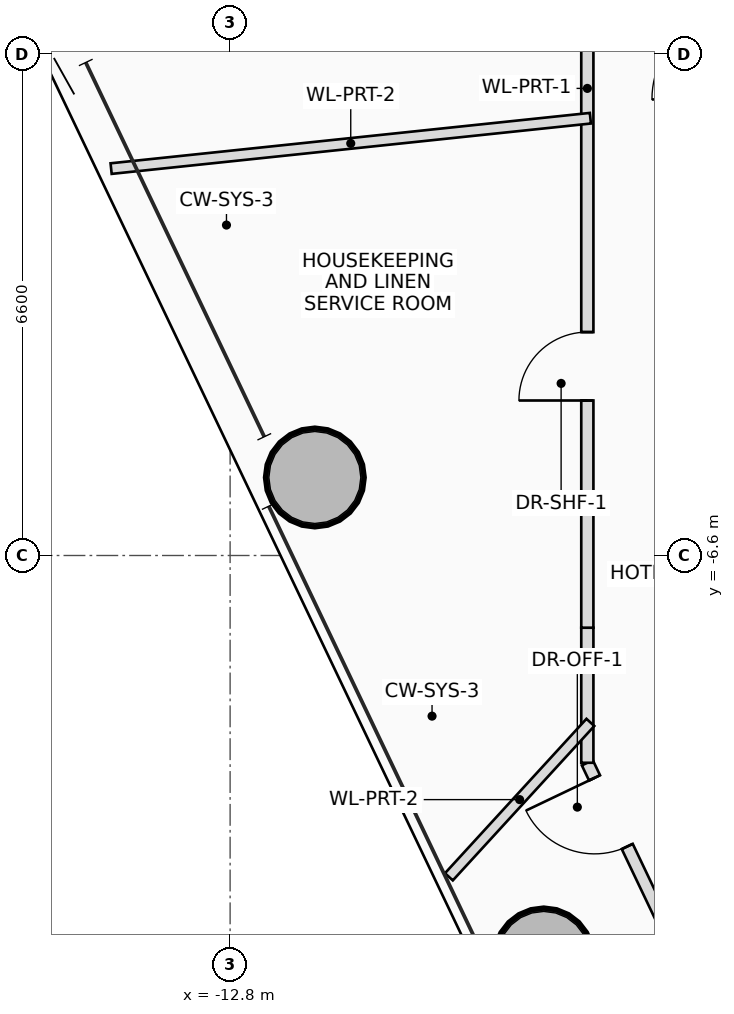
"""IFC4 building model, lengths in metres.
Left out: names, types, materials, properties, quantities, classifications, styles, units other than length and angle.
Written with IfcOpenShell. Run it as: python <this file> out.ifc"""

import sys

from ifc_helpers import new_model, si_unit, direction, frame, frame_2d, origin, origin_2d, place, context, subcontext, project, spatial, rectangle, hollow_circle, extrude, source, transform, mapped, element, fill, save


model = new_model("IFC4")
c1 = context("Model", 3, precision=1e-05, world=origin(), true_north=direction((0.0, 1.0)))
c2 = subcontext(c1, "Body", "Model", "MODEL_VIEW")
j1 = project(units=[si_unit("LENGTHUNIT", "METRE"), si_unit("PLANEANGLEUNIT", "RADIAN")], contexts=[c1])
p1 = place(None, origin())
s1 = spatial("IfcSite", under=j1, at=p1, CompositionType="ELEMENT")
p2 = place(p1, origin())
s2 = spatial("IfcBuilding", under=s1, at=p2, CompositionType="ELEMENT")
p3 = place(p2, frame((0.0, 0.0, 132.95)))
s3 = spatial("IfcBuildingStorey", under=s2, at=p3, CompositionType="ELEMENT", Elevation=132.95)
m1 = source(origin(), c2, "Body", "SweptSolid", [
    extrude(hollow_circle(Radius=0.65, WallThickness=0.045, at=origin_2d()), origin(), (0.0, 0.0, 1.0), 3.45),
])
for number, where, z_axis, x_axis in (
    (1, (-11.685, -5.573, 0.0), (0.0, 0.0, 1.0), (1.0, 0.0, 0.0)),
    (2, (-8.674, -11.888, 0.0), (0.0, 0.0, 1.0), (1.0, 0.0, 0.0)),
):
    element("IfcColumn", number, at=place(p3, frame(where, z_axis=z_axis, x_axis=x_axis)), inside=s3, PredefinedType="COLUMN", context=c2, shape_type="MappedRepresentation", body=[
        mapped(m1, transform((0.0, 0.0, 0.0), scale=1.0)),
    ])
p4 = place(p3, frame((-6.539, -12.6, 0.0), z_axis=(0.0, 0.0, 1.0), x_axis=(-0.430521464151, 0.902580339308, 0.0)))
e3 = element("IfcWall", 3, at=p4, inside=s3, PredefinedType="PARTITIONING", context=c2, shape_type="SweptSolid", body=[
    extrude(rectangle(XDim=3.626, YDim=0.16, at=frame_2d((1.813, 0.0))), origin(), (0.0, 0.0, 1.0), 2.605),
])
p5 = place(p4, frame((2.406, 0.0, 0.0)))
e4 = element("IfcOpeningElement", 4, at=p5, cuts=e3, PredefinedType="OPENING", context=c2, shape_type="SweptSolid", body=[
    extrude(rectangle(XDim=1.0, YDim=2.25, at=frame_2d((0.5, 1.125))), frame((0.0, 0.09, 0.0), z_axis=(0.0, -1.0, 0.0), x_axis=(1.0, 0.0, 0.0)), (0.0, 0.0, 1.0), 0.18),
])
p6 = place(p3, frame((-8.1, -9.327, 0.0), z_axis=(0.0, 0.0, 1.0), x_axis=(0.0, 1.0, 0.0)))
e5 = element("IfcWall", 5, at=p6, inside=s3, PredefinedType="PARTITIONING", context=c2, shape_type="SweptSolid", body=[
    extrude(rectangle(XDim=1.777, YDim=0.16, at=frame_2d((0.888, 0.0))), origin(), (0.0, 0.0, 1.0), 3.25),
])
p7 = place(p3, frame((-8.1, -7.55, 0.0), z_axis=(0.0, 0.0, 1.0), x_axis=(0.0, 1.0, 0.0)))
e6 = element("IfcWall", 6, at=p7, inside=s3, PredefinedType="PARTITIONING", context=c2, shape_type="SweptSolid", body=[
    extrude(rectangle(XDim=15.1, YDim=0.16, at=frame_2d((7.55, 0.0))), origin(), (0.0, 0.0, 1.0), 2.605),
])
p8 = place(p7, frame((2.989, 0.0, 0.0)))
e7 = element("IfcOpeningElement", 7, at=p8, cuts=e6, PredefinedType="OPENING", context=c2, shape_type="SweptSolid", body=[
    extrude(rectangle(XDim=0.9, YDim=2.05, at=frame_2d((0.45, 1.025))), frame((0.0, 0.09, 0.0), z_axis=(0.0, -1.0, 0.0), x_axis=(1.0, 0.0, 0.0)), (0.0, 0.0, 1.0), 0.18),
])
p9 = place(p7, frame((10.301, 0.0, 0.0)))
e8 = element("IfcOpeningElement", 8, at=p9, cuts=e6, PredefinedType="OPENING", context=c2, shape_type="SweptSolid", body=[
    extrude(rectangle(XDim=1.0, YDim=2.25, at=frame_2d((0.5, 1.125))), frame((0.0, 0.09, 0.0), z_axis=(0.0, -1.0, 0.0), x_axis=(1.0, 0.0, 0.0)), (0.0, 0.0, 1.0), 0.18),
])
p10 = place(p3, frame((-8.06, -0.847, 0.0), z_axis=(0.0, 0.0, 1.0), x_axis=(-0.994520422967, -0.104542471285, 0.0)))
e9 = element("IfcWall", 9, at=p10, inside=s3, PredefinedType="PARTITIONING", context=c2, shape_type="SweptSolid", body=[
    extrude(rectangle(XDim=6.34, YDim=0.14, at=frame_2d((3.17, 0.0))), origin(), (0.0, 0.0, 1.0), 2.765),
])
p11 = place(p3, frame((-8.06, -8.796, 0.0), z_axis=(0.0, 0.0, 1.0), x_axis=(-0.67555207399, -0.737312278026, 0.0)))
e10 = element("IfcWall", 10, at=p11, inside=s3, PredefinedType="PARTITIONING", context=c2, shape_type="SweptSolid", body=[
    extrude(rectangle(XDim=2.755, YDim=0.14, at=frame_2d((1.378, 0.0))), origin(), (0.0, 0.0, 1.0), 2.765),
])
p12 = place(p5, origin())
e11 = element("IfcDoor", 11, at=p12, inside=s3, OperationType="SINGLE_SWING_RIGHT", PredefinedType="DOOR", context=c2, shape_type="SweptSolid", body=[
    extrude(rectangle(XDim=1.0, YDim=2.25, at=frame_2d((0.5, 1.125))), frame((0.0, 0.025, 0.0), z_axis=(0.0, -1.0, 0.0), x_axis=(1.0, 0.0, 0.0)), (0.0, 0.0, 1.0), 0.05),
])
fill(e4, e11)
p13 = place(p8, origin())
e12 = element("IfcDoor", 12, at=p13, inside=s3, OperationType="SINGLE_SWING_LEFT", PredefinedType="DOOR", context=c2, shape_type="SweptSolid", body=[
    extrude(rectangle(XDim=0.9, YDim=2.05, at=frame_2d((0.45, 1.025))), frame((0.0, 0.025, 0.0), z_axis=(0.0, -1.0, 0.0), x_axis=(1.0, 0.0, 0.0)), (0.0, 0.0, 1.0), 0.05),
])
fill(e7, e12)
save(model, sys.argv[1])
